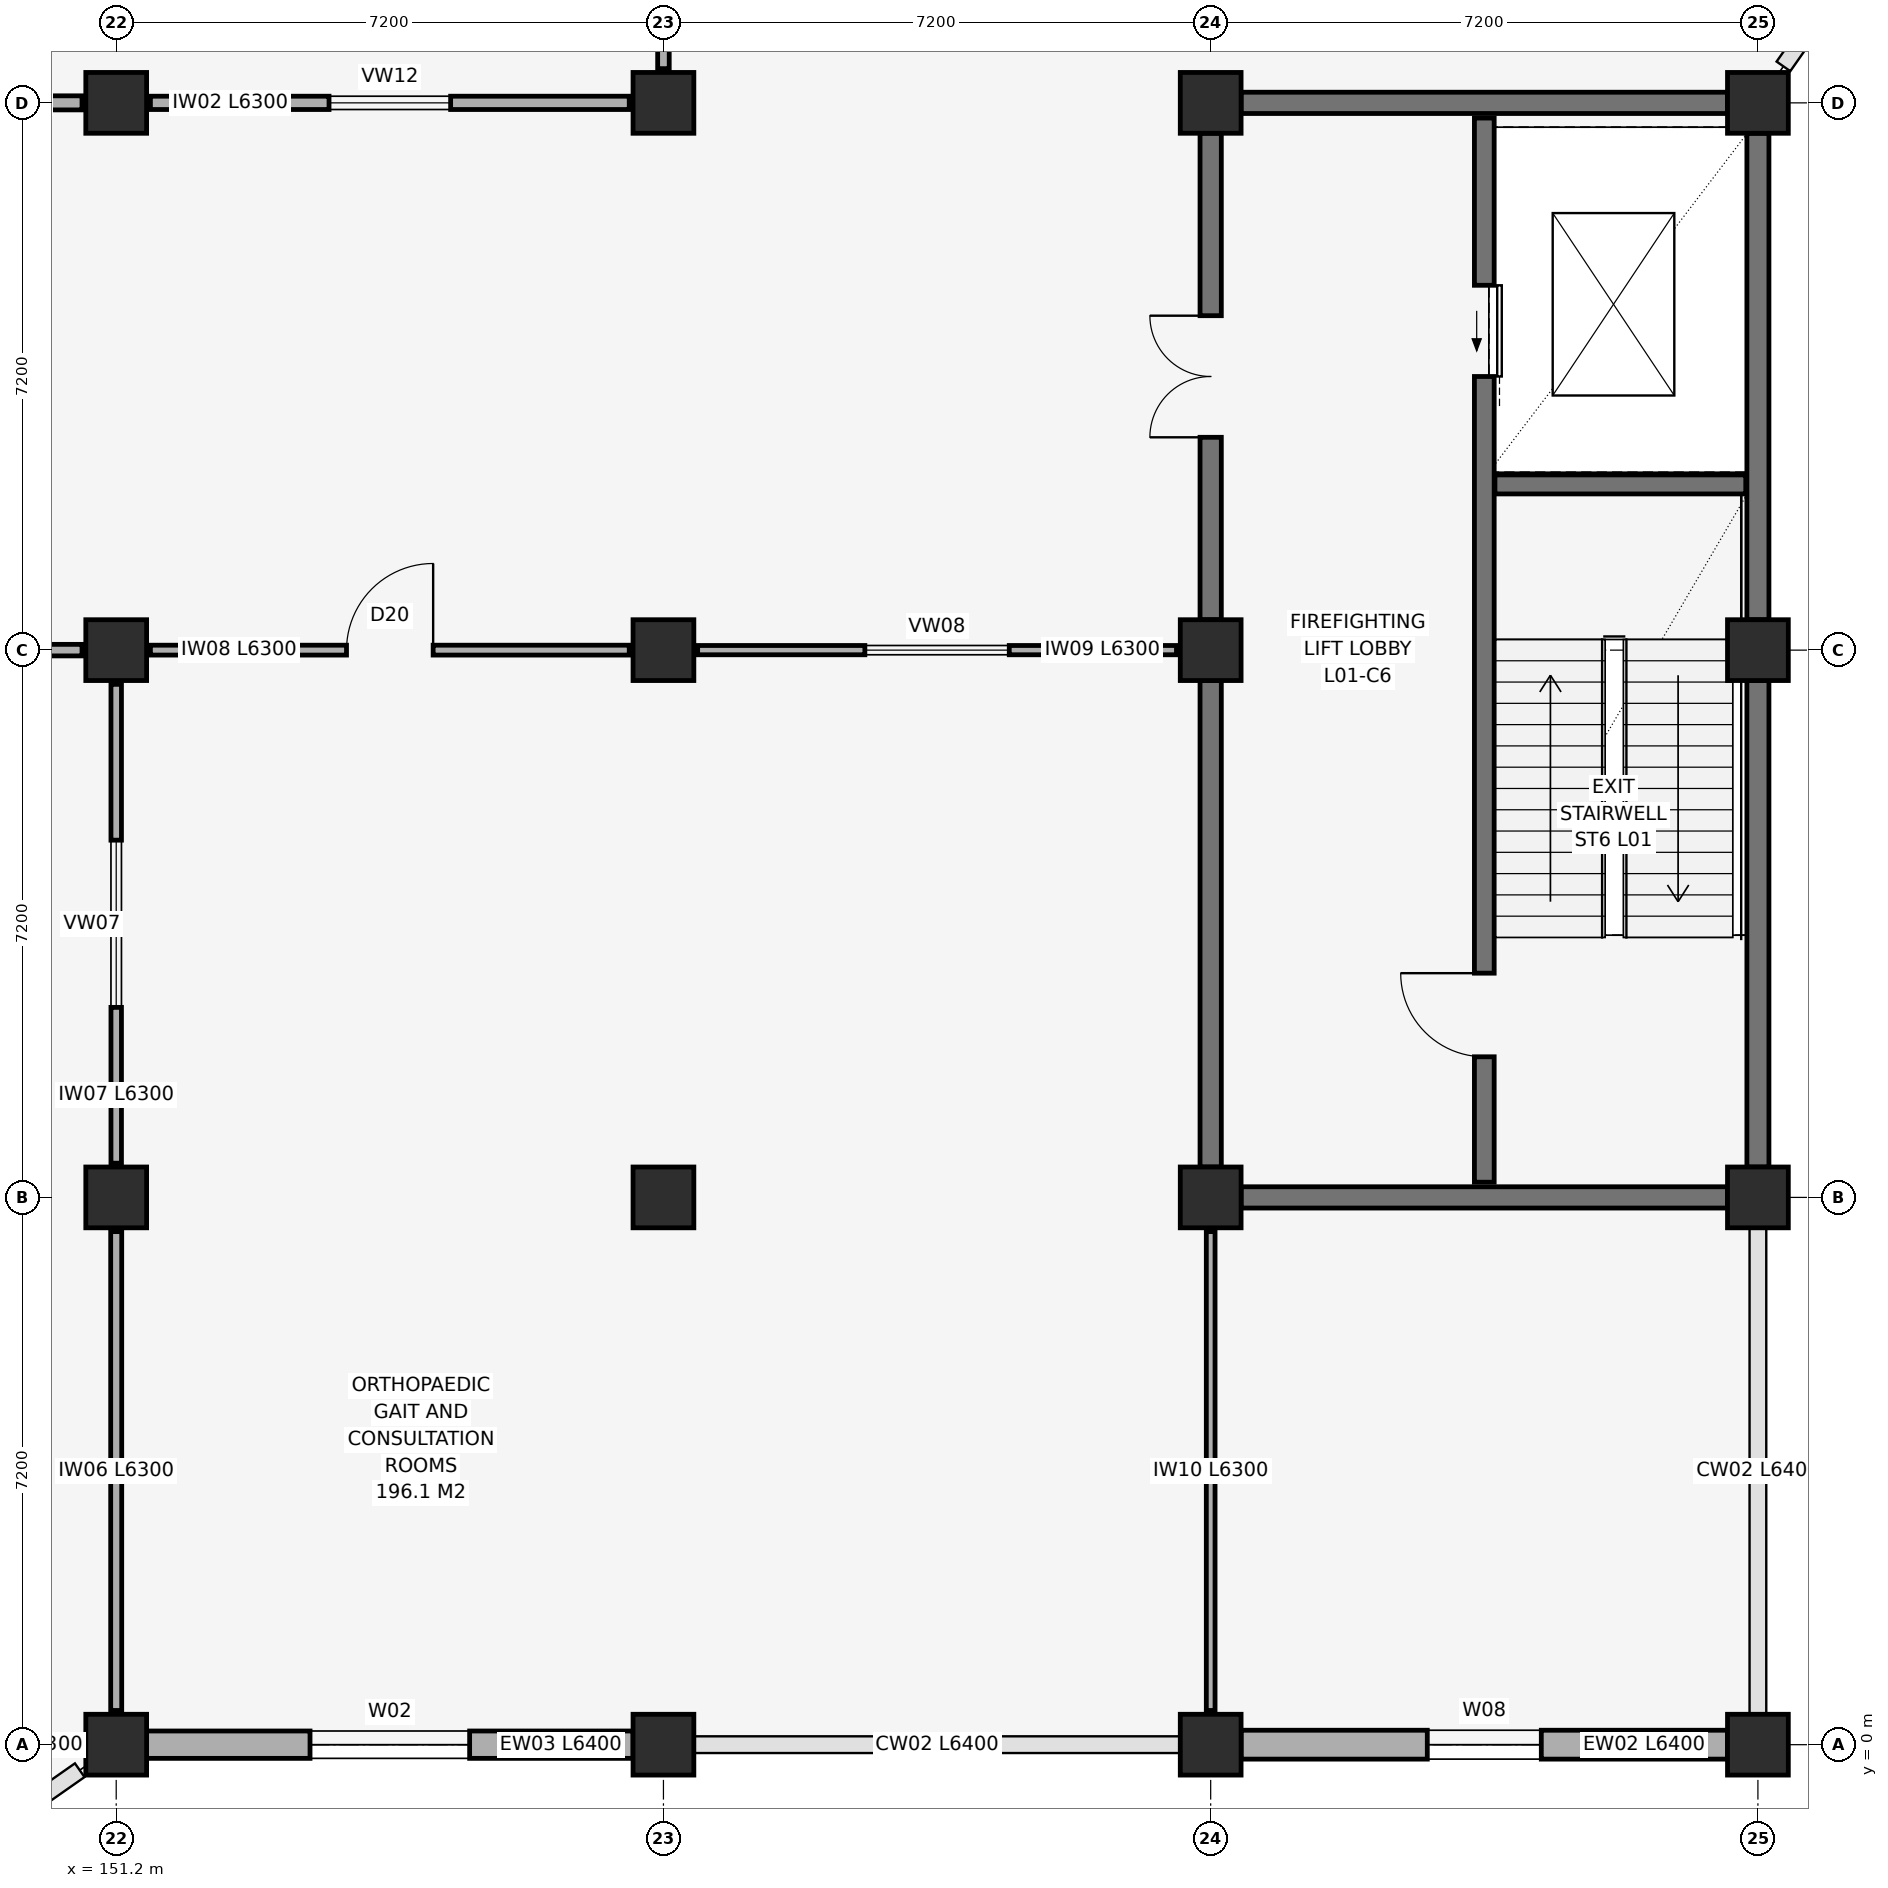
"""IFC4 building model, lengths in metres.
Left out: names, types, materials, properties, quantities, classifications, styles, units other than length and angle.
Written with IfcOpenShell. Run it as: python <this file> out.ifc"""

import sys

from ifc_helpers import new_model, si_unit, direction, frame, frame_2d, origin, origin_2d, place, context, subcontext, project, spatial, rectangle, extrude, element, fill, save


model = new_model("IFC4")
c1 = context("Model", 3, precision=1e-05, world=origin(), true_north=direction((0.0, 1.0)))
c2 = subcontext(c1, "Body", "Model", "MODEL_VIEW")
j1 = project(units=[si_unit("LENGTHUNIT", "METRE"), si_unit("PLANEANGLEUNIT", "RADIAN")], contexts=[c1])
p1 = place(None, origin())
s1 = spatial("IfcSite", under=j1, at=p1, CompositionType="ELEMENT")
p2 = place(p1, origin())
s2 = spatial("IfcBuilding", under=s1, at=p2, CompositionType="ELEMENT")
p3 = place(p2, frame((0.0, 0.0, 5.4)))
s3 = spatial("IfcBuildingStorey", under=s2, at=p3, CompositionType="ELEMENT", Elevation=5.4)
for number, where, z_axis, x_axis in (
    (1, (151.2, 0.0, 0.0), (0.0, 0.0, 1.0), (1.0, 0.0, 0.0)),
    (2, (151.2, 7.2, 0.0), (0.0, 0.0, 1.0), (1.0, 0.0, 0.0)),
    (3, (151.2, 14.4, 0.0), (0.0, 0.0, 1.0), (1.0, 0.0, 0.0)),
    (4, (151.2, 21.6, 0.0), (0.0, 0.0, 1.0), (1.0, 0.0, 0.0)),
    (5, (158.4, 0.0, 0.0), (0.0, 0.0, 1.0), (1.0, 0.0, 0.0)),
    (6, (158.4, 7.2, 0.0), (0.0, 0.0, 1.0), (1.0, 0.0, 0.0)),
    (7, (158.4, 14.4, 0.0), (0.0, 0.0, 1.0), (1.0, 0.0, 0.0)),
    (8, (158.4, 21.6, 0.0), (0.0, 0.0, 1.0), (1.0, 0.0, 0.0)),
    (9, (165.6, 0.0, 0.0), (0.0, 0.0, 1.0), (1.0, 0.0, 0.0)),
    (10, (165.6, 7.2, 0.0), (0.0, 0.0, 1.0), (1.0, 0.0, 0.0)),
    (11, (165.6, 14.4, 0.0), (0.0, 0.0, 1.0), (1.0, 0.0, 0.0)),
    (12, (165.6, 21.6, 0.0), (0.0, 0.0, 1.0), (1.0, 0.0, 0.0)),
    (13, (172.8, 0.0, 0.0), (0.0, 0.0, 1.0), (1.0, 0.0, 0.0)),
    (14, (172.8, 7.2, 0.0), (0.0, 0.0, 1.0), (1.0, 0.0, 0.0)),
    (15, (172.8, 14.4, 0.0), (0.0, 0.0, 1.0), (1.0, 0.0, 0.0)),
    (16, (172.8, 21.6, 0.0), (0.0, 0.0, 1.0), (1.0, 0.0, 0.0)),
):
    element("IfcColumn", number, at=place(p3, frame(where, z_axis=z_axis, x_axis=x_axis)), inside=s3, PredefinedType="COLUMN", context=c2, shape_type="SweptSolid", body=[
        extrude(rectangle(XDim=0.8, YDim=0.8, at=origin_2d()), origin(), (0.0, 0.0, 1.0), 4.8),
    ])
p4 = place(p3, frame((151.6, 0.0, 0.0), z_axis=(0.0, 0.0, 1.0), x_axis=(1.0, 0.0, 0.0)))
e17 = element("IfcWall", 17, at=p4, inside=s3, PredefinedType="SOLIDWALL", context=c2, shape_type="SweptSolid", body=[
    extrude(rectangle(XDim=6.4, YDim=0.36, at=frame_2d((3.2, 0.0))), origin(), (0.0, 0.0, 1.0), 4.19),
])
p5 = place(p4, frame((2.15, 0.0, 0.95)))
e18 = element("IfcOpeningElement", 18, at=p5, cuts=e17, PredefinedType="OPENING", context=c2, shape_type="SweptSolid", body=[
    extrude(rectangle(XDim=2.1, YDim=2.65, at=frame_2d((1.05, 1.325))), frame((0.0, 0.195, 0.0), z_axis=(0.0, -1.0, 0.0), x_axis=(1.0, 0.0, 0.0)), (0.0, 0.0, 1.0), 0.39),
])
p6 = place(p3, frame((166.0, 0.0, 0.0), z_axis=(0.0, 0.0, 1.0), x_axis=(1.0, 0.0, 0.0)))
e19 = element("IfcWall", 19, at=p6, inside=s3, PredefinedType="SOLIDWALL", context=c2, shape_type="SweptSolid", body=[
    extrude(rectangle(XDim=6.4, YDim=0.38, at=frame_2d((3.2, 0.0))), origin(), (0.0, 0.0, 1.0), 4.19),
])
p7 = place(p6, frame((2.45, 0.0, 0.95)))
e20 = element("IfcOpeningElement", 20, at=p7, cuts=e19, PredefinedType="OPENING", context=c2, shape_type="SweptSolid", body=[
    extrude(rectangle(XDim=1.5, YDim=2.0, at=frame_2d((0.75, 1.0))), frame((0.0, 0.205, 0.0), z_axis=(0.0, -1.0, 0.0), x_axis=(1.0, 0.0, 0.0)), (0.0, 0.0, 1.0), 0.41),
])
for number, where, z_axis, x_axis in (
    (21, (166.0, 7.2, 0.0), (0.0, 0.0, 1.0), (1.0, 0.0, 0.0)),
    (22, (166.0, 21.6, 0.0), (0.0, 0.0, 1.0), (1.0, 0.0, 0.0)),
    (23, (165.6, 7.6, 0.0), (0.0, 0.0, 1.0), (0.0, 1.0, 0.0)),
):
    element("IfcWall", number, at=place(p3, frame(where, z_axis=z_axis, x_axis=x_axis)), inside=s3, PredefinedType="SHEAR", context=c2, shape_type="SweptSolid", body=[
        extrude(rectangle(XDim=6.4, YDim=0.28, at=frame_2d((3.2, 0.0))), origin(), (0.0, 0.0, 1.0), 4.54),
    ])
p8 = place(p3, frame((165.6, 14.8, 0.0), z_axis=(0.0, 0.0, 1.0), x_axis=(0.0, 1.0, 0.0)))
e24 = element("IfcWall", 24, at=p8, inside=s3, PredefinedType="SHEAR", context=c2, shape_type="SweptSolid", body=[
    extrude(rectangle(XDim=6.4, YDim=0.28, at=frame_2d((3.2, 0.0))), origin(), (0.0, 0.0, 1.0), 4.54),
])
p9 = place(p8, frame((2.4, 0.0, 0.0)))
e25 = element("IfcOpeningElement", 25, at=p9, cuts=e24, PredefinedType="OPENING", context=c2, shape_type="SweptSolid", body=[
    extrude(rectangle(XDim=1.6, YDim=2.2, at=frame_2d((0.8, 1.1))), frame((0.0, 0.155, 0.0), z_axis=(0.0, -1.0, 0.0), x_axis=(1.0, 0.0, 0.0)), (0.0, 0.0, 1.0), 0.31),
])
for number, where, z_axis, x_axis in (
    (26, (172.8, 7.6, 0.0), (0.0, 0.0, 1.0), (0.0, 1.0, 0.0)),
    (27, (172.8, 14.8, 0.0), (0.0, 0.0, 1.0), (0.0, 1.0, 0.0)),
):
    element("IfcWall", number, at=place(p3, frame(where, z_axis=z_axis, x_axis=x_axis)), inside=s3, PredefinedType="SHEAR", context=c2, shape_type="SweptSolid", body=[
        extrude(rectangle(XDim=6.4, YDim=0.29, at=frame_2d((3.2, 0.0))), origin(), (0.0, 0.0, 1.0), 4.54),
    ])
p10 = place(p3, frame((169.2, 7.4, 0.0), z_axis=(0.0, 0.0, 1.0), x_axis=(0.0, 1.0, 0.0)))
e28 = element("IfcWall", 28, at=p10, inside=s3, PredefinedType="SHEAR", context=c2, shape_type="SweptSolid", body=[
    extrude(rectangle(XDim=14.0, YDim=0.26, at=frame_2d((7.0, 0.0))), origin(), (0.0, 0.0, 1.0), 4.54),
])
p11 = place(p10, frame((1.65, 0.0, 0.0)))
e29 = element("IfcOpeningElement", 29, at=p11, cuts=e28, PredefinedType="OPENING", context=c2, shape_type="SweptSolid", body=[
    extrude(rectangle(XDim=1.1, YDim=2.15, at=frame_2d((0.55, 1.075))), frame((0.0, 0.145, 0.0), z_axis=(0.0, -1.0, 0.0), x_axis=(1.0, 0.0, 0.0)), (0.0, 0.0, 1.0), 0.29),
])
p12 = place(p10, frame((10.6, 0.0, 0.0)))
e30 = element("IfcOpeningElement", 30, at=p12, cuts=e28, PredefinedType="OPENING", context=c2, shape_type="SweptSolid", body=[
    extrude(rectangle(XDim=1.2, YDim=2.25, at=frame_2d((0.6, 1.125))), frame((0.0, 0.145, 0.0), z_axis=(0.0, -1.0, 0.0), x_axis=(1.0, 0.0, 0.0)), (0.0, 0.0, 1.0), 0.29),
])
p13 = place(p3, frame((169.34, 16.58, 0.0), z_axis=(0.0, 0.0, 1.0), x_axis=(1.0, 0.0, 0.0)))
e31 = element("IfcWall", 31, at=p13, inside=s3, PredefinedType="SHEAR", context=c2, shape_type="SweptSolid", body=[
    extrude(rectangle(XDim=3.3, YDim=0.25, at=frame_2d((1.65, 0.0))), origin(), (0.0, 0.0, 1.0), 4.54),
])
p14 = place(p3, frame((144.45, 0.0, 0.0), z_axis=(0.0, 0.0, 1.0), x_axis=(1.0, 0.0, 0.0)))
e32 = element("IfcWall", 32, at=p14, inside=s3, PredefinedType="PARTITIONING", context=c2, shape_type="SweptSolid", body=[
    extrude(rectangle(XDim=6.3, YDim=0.175, at=frame_2d((3.15, 0.0))), origin(), (0.0, 0.0, 1.0), 4.19),
])
p15 = place(p14, frame((1.75, 0.0, 0.95)))
e33 = element("IfcOpeningElement", 33, at=p15, cuts=e32, PredefinedType="OPENING", context=c2, shape_type="SweptSolid", body=[
    extrude(rectangle(XDim=2.8, YDim=1.35, at=frame_2d((1.4, 0.675))), frame((0.0, 0.103, 0.0), z_axis=(0.0, -1.0, 0.0), x_axis=(1.0, 0.0, 0.0)), (0.0, 0.0, 1.0), 0.205),
])
p16 = place(p3, frame((144.45, 14.4, 0.0), z_axis=(0.0, 0.0, 1.0), x_axis=(1.0, 0.0, 0.0)))
e34 = element("IfcWall", 34, at=p16, inside=s3, PredefinedType="PARTITIONING", context=c2, shape_type="SweptSolid", body=[
    extrude(rectangle(XDim=6.3, YDim=0.152, at=frame_2d((3.15, 0.0))), origin(), (0.0, 0.0, 1.0), 3.952),
])
p17 = place(p3, frame((151.2, 0.45, 0.0), z_axis=(0.0, 0.0, 1.0), x_axis=(0.0, 1.0, 0.0)))
e35 = element("IfcWall", 35, at=p17, inside=s3, PredefinedType="PARTITIONING", context=c2, shape_type="SweptSolid", body=[
    extrude(rectangle(XDim=6.3, YDim=0.145, at=frame_2d((3.15, 0.0))), origin(), (0.0, 0.0, 1.0), 3.74),
])
p18 = place(p3, frame((151.2, 7.65, 0.0), z_axis=(0.0, 0.0, 1.0), x_axis=(0.0, 1.0, 0.0)))
e36 = element("IfcWall", 36, at=p18, inside=s3, PredefinedType="PARTITIONING", context=c2, shape_type="SweptSolid", body=[
    extrude(rectangle(XDim=6.3, YDim=0.138, at=frame_2d((3.15, 0.0))), origin(), (0.0, 0.0, 1.0), 4.052),
])
p19 = place(p18, frame((2.05, 0.0, 0.95)))
e37 = element("IfcOpeningElement", 37, at=p19, cuts=e36, PredefinedType="OPENING", context=c2, shape_type="SweptSolid", body=[
    extrude(rectangle(XDim=2.2, YDim=1.35, at=frame_2d((1.1, 0.675))), frame((0.0, 0.084, 0.0), z_axis=(0.0, -1.0, 0.0), x_axis=(1.0, 0.0, 0.0)), (0.0, 0.0, 1.0), 0.168),
])
p20 = place(p3, frame((151.65, 14.4, 0.0), z_axis=(0.0, 0.0, 1.0), x_axis=(1.0, 0.0, 0.0)))
e38 = element("IfcWall", 38, at=p20, inside=s3, PredefinedType="PARTITIONING", context=c2, shape_type="SweptSolid", body=[
    extrude(rectangle(XDim=6.3, YDim=0.13, at=frame_2d((3.15, 0.0))), origin(), (0.0, 0.0, 1.0), 3.952),
])
p21 = place(p20, frame((2.58, 0.0, 0.0)))
e39 = element("IfcOpeningElement", 39, at=p21, cuts=e38, PredefinedType="OPENING", context=c2, shape_type="SweptSolid", body=[
    extrude(rectangle(XDim=1.14, YDim=2.15, at=frame_2d((0.57, 1.075))), frame((0.0, 0.08, 0.0), z_axis=(0.0, -1.0, 0.0), x_axis=(1.0, 0.0, 0.0)), (0.0, 0.0, 1.0), 0.16),
])
p22 = place(p3, frame((158.85, 14.4, 0.0), z_axis=(0.0, 0.0, 1.0), x_axis=(1.0, 0.0, 0.0)))
e40 = element("IfcWall", 40, at=p22, inside=s3, PredefinedType="PARTITIONING", context=c2, shape_type="SweptSolid", body=[
    extrude(rectangle(XDim=6.3, YDim=0.122, at=frame_2d((3.15, 0.0))), origin(), (0.0, 0.0, 1.0), 3.952),
])
p23 = place(p22, frame((2.2, 0.0, 0.95)))
e41 = element("IfcOpeningElement", 41, at=p23, cuts=e40, PredefinedType="OPENING", context=c2, shape_type="SweptSolid", body=[
    extrude(rectangle(XDim=1.9, YDim=1.35, at=frame_2d((0.95, 0.675))), frame((0.0, 0.076, 0.0), z_axis=(0.0, -1.0, 0.0), x_axis=(1.0, 0.0, 0.0)), (0.0, 0.0, 1.0), 0.152),
])
p24 = place(p3, frame((165.6, 0.45, 0.0), z_axis=(0.0, 0.0, 1.0), x_axis=(0.0, 1.0, 0.0)))
e42 = element("IfcWall", 42, at=p24, inside=s3, PredefinedType="PARTITIONING", context=c2, shape_type="SweptSolid", body=[
    extrude(rectangle(XDim=6.3, YDim=0.115, at=frame_2d((3.15, 0.0))), origin(), (0.0, 0.0, 1.0), 4.052),
])
p25 = place(p3, frame((144.45, 21.6, 0.0), z_axis=(0.0, 0.0, 1.0), x_axis=(1.0, 0.0, 0.0)))
e43 = element("IfcWall", 43, at=p25, inside=s3, PredefinedType="PARTITIONING", context=c2, shape_type="SweptSolid", body=[
    extrude(rectangle(XDim=6.3, YDim=0.185, at=frame_2d((3.15, 0.0))), origin(), (0.0, 0.0, 1.0), 3.952),
])
p26 = place(p25, frame((2.62, 0.0, 0.0)))
e44 = element("IfcOpeningElement", 44, at=p26, cuts=e43, PredefinedType="OPENING", context=c2, shape_type="SweptSolid", body=[
    extrude(rectangle(XDim=1.06, YDim=2.15, at=frame_2d((0.53, 1.075))), frame((0.0, 0.107, 0.0), z_axis=(0.0, -1.0, 0.0), x_axis=(1.0, 0.0, 0.0)), (0.0, 0.0, 1.0), 0.215),
])
p27 = place(p3, frame((151.65, 21.6, 0.0), z_axis=(0.0, 0.0, 1.0), x_axis=(1.0, 0.0, 0.0)))
e45 = element("IfcWall", 45, at=p27, inside=s3, PredefinedType="PARTITIONING", context=c2, shape_type="SweptSolid", body=[
    extrude(rectangle(XDim=6.3, YDim=0.175, at=frame_2d((3.15, 0.0))), origin(), (0.0, 0.0, 1.0), 3.952),
])
p28 = place(p27, frame((2.35, 0.0, 0.95)))
e46 = element("IfcOpeningElement", 46, at=p28, cuts=e45, PredefinedType="OPENING", context=c2, shape_type="SweptSolid", body=[
    extrude(rectangle(XDim=1.6, YDim=1.2, at=frame_2d((0.8, 0.6))), frame((0.0, 0.103, 0.0), z_axis=(0.0, -1.0, 0.0), x_axis=(1.0, 0.0, 0.0)), (0.0, 0.0, 1.0), 0.205),
])
p29 = place(p3, frame((158.4, 22.05, 0.0), z_axis=(0.0, 0.0, 1.0), x_axis=(0.0, 1.0, 0.0)))
e47 = element("IfcWall", 47, at=p29, inside=s3, PredefinedType="PARTITIONING", context=c2, shape_type="SweptSolid", body=[
    extrude(rectangle(XDim=6.3, YDim=0.152, at=frame_2d((3.15, 0.0))), origin(), (0.0, 0.0, 1.0), 4.052),
])
p30 = place(p5, origin())
e48 = element("IfcWindow", 48, at=p30, inside=s3, PartitioningType="SINGLE_PANEL", PredefinedType="WINDOW", context=c2, shape_type="SweptSolid", body=[
    extrude(rectangle(XDim=2.1, YDim=2.65, at=frame_2d((1.05, 1.325))), frame((0.0, 0.03, 0.0), z_axis=(0.0, -1.0, 0.0), x_axis=(1.0, 0.0, 0.0)), (0.0, 0.0, 1.0), 0.06),
])
fill(e18, e48)
p31 = place(p7, origin())
e49 = element("IfcWindow", 49, at=p31, inside=s3, PartitioningType="SINGLE_PANEL", PredefinedType="WINDOW", context=c2, shape_type="SweptSolid", body=[
    extrude(rectangle(XDim=1.5, YDim=2.0, at=frame_2d((0.75, 1.0))), frame((0.0, 0.03, 0.0), z_axis=(0.0, -1.0, 0.0), x_axis=(1.0, 0.0, 0.0)), (0.0, 0.0, 1.0), 0.06),
])
fill(e20, e49)
p32 = place(p11, frame((1.1, 0.0, 0.0), z_axis=(0.0, 0.0, 1.0), x_axis=(-1.0, 0.0, 0.0)))
e50 = element("IfcDoor", 50, at=p32, inside=s3, OperationType="SINGLE_SWING_LEFT", PredefinedType="DOOR", context=c2, shape_type="SweptSolid", body=[
    extrude(rectangle(XDim=1.1, YDim=2.15, at=frame_2d((0.55, 1.075))), frame((0.0, 0.025, 0.0), z_axis=(0.0, -1.0, 0.0), x_axis=(1.0, 0.0, 0.0)), (0.0, 0.0, 1.0), 0.05),
])
fill(e29, e50)
p33 = place(p12, origin())
e51 = element("IfcDoor", 51, at=p33, inside=s3, OperationType="SLIDING_TO_LEFT", PredefinedType="DOOR", context=c2, shape_type="SweptSolid", body=[
    extrude(rectangle(XDim=1.2, YDim=2.25, at=frame_2d((0.6, 1.125))), frame((0.0, 0.025, 0.0), z_axis=(0.0, -1.0, 0.0), x_axis=(1.0, 0.0, 0.0)), (0.0, 0.0, 1.0), 0.05),
])
fill(e30, e51)
p34 = place(p9, origin())
e52 = element("IfcDoor", 52, at=p34, inside=s3, OperationType="DOUBLE_SWING_LEFT", PredefinedType="DOOR", context=c2, shape_type="SweptSolid", body=[
    extrude(rectangle(XDim=1.6, YDim=2.2, at=frame_2d((0.8, 1.1))), frame((0.0, 0.025, 0.0), z_axis=(0.0, -1.0, 0.0), x_axis=(1.0, 0.0, 0.0)), (0.0, 0.0, 1.0), 0.05),
])
fill(e25, e52)
p35 = place(p19, origin())
e53 = element("IfcWindow", 53, at=p35, inside=s3, PartitioningType="SINGLE_PANEL", PredefinedType="WINDOW", context=c2, shape_type="SweptSolid", body=[
    extrude(rectangle(XDim=2.2, YDim=1.35, at=frame_2d((1.1, 0.675))), frame((0.0, 0.03, 0.0), z_axis=(0.0, -1.0, 0.0), x_axis=(1.0, 0.0, 0.0)), (0.0, 0.0, 1.0), 0.06),
])
fill(e37, e53)
p36 = place(p21, frame((1.14, 0.0, 0.0), z_axis=(0.0, 0.0, 1.0), x_axis=(-1.0, 0.0, 0.0)))
e54 = element("IfcDoor", 54, at=p36, inside=s3, OperationType="SINGLE_SWING_LEFT", PredefinedType="DOOR", context=c2, shape_type="SweptSolid", body=[
    extrude(rectangle(XDim=1.14, YDim=2.15, at=frame_2d((0.57, 1.075))), frame((0.0, 0.025, 0.0), z_axis=(0.0, -1.0, 0.0), x_axis=(1.0, 0.0, 0.0)), (0.0, 0.0, 1.0), 0.05),
])
fill(e39, e54)
p37 = place(p23, origin())
e55 = element("IfcWindow", 55, at=p37, inside=s3, PartitioningType="SINGLE_PANEL", PredefinedType="WINDOW", context=c2, shape_type="SweptSolid", body=[
    extrude(rectangle(XDim=1.9, YDim=1.35, at=frame_2d((0.95, 0.675))), frame((0.0, 0.03, 0.0), z_axis=(0.0, -1.0, 0.0), x_axis=(1.0, 0.0, 0.0)), (0.0, 0.0, 1.0), 0.06),
])
fill(e41, e55)
p38 = place(p28, origin())
e56 = element("IfcWindow", 56, at=p38, inside=s3, PartitioningType="SINGLE_PANEL", PredefinedType="WINDOW", context=c2, shape_type="SweptSolid", body=[
    extrude(rectangle(XDim=1.6, YDim=1.2, at=frame_2d((0.8, 0.6))), frame((0.0, 0.03, 0.0), z_axis=(0.0, -1.0, 0.0), x_axis=(1.0, 0.0, 0.0)), (0.0, 0.0, 1.0), 0.06),
])
fill(e46, e56)
save(model, sys.argv[1])
